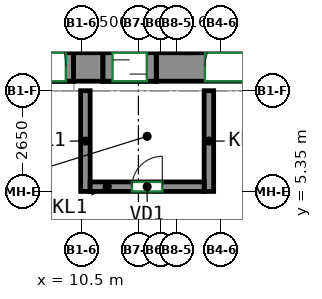
"""IFC4 building model, lengths in metres.
Left out: names, types, materials, properties, quantities, classifications, styles, units other than length and angle.
Written with IfcOpenShell. Run it as: python <this file> out.ifc"""

import sys

from ifc_helpers import new_model, si_unit, direction, frame, frame_2d, origin, place, context, subcontext, project, spatial, rectangle, extrude, source, transform, mapped, element, fill, save


model = new_model("IFC4")
c1 = context("Model", 3, precision=1e-05, world=origin(), true_north=direction((0.0, 1.0)))
c2 = subcontext(c1, "Body", "Model", "MODEL_VIEW")
j1 = project(units=[si_unit("LENGTHUNIT", "METRE"), si_unit("PLANEANGLEUNIT", "RADIAN")], contexts=[c1])
p1 = place(None, origin())
s1 = spatial("IfcSite", under=j1, at=p1, CompositionType="ELEMENT")
p2 = place(p1, origin())
s2 = spatial("IfcBuilding", under=s1, at=p2, CompositionType="ELEMENT")
p3 = place(p2, frame((0.0, 0.0, 223.7)))
s3 = spatial("IfcBuildingStorey", under=s2, at=p3, CompositionType="ELEMENT", Elevation=223.7)
m1 = source(origin(), c2, "Body", "SweptSolid", [
    extrude(rectangle(XDim=0.78, YDim=0.75, at=frame_2d((0.39, 0.0))), origin(), (0.0, 0.0, 1.0), 9.5),
])
p4 = place(p3, frame((10.29, 8.625, 0.0), z_axis=(0.0, 0.0, 1.0), x_axis=(1.0, 0.0, 0.0)))
e1 = element("IfcWall", 1, at=p4, inside=s3, PredefinedType="SHEAR", context=c2, shape_type="MappedRepresentation", body=[
    mapped(m1, transform((0.0, 0.0, 0.0))),
])
m2 = source(origin(), c2, "Body", "SweptSolid", [
    extrude(rectangle(XDim=5.38, YDim=0.75, at=frame_2d((2.69, 0.0))), origin(), (0.0, 0.0, 1.0), 9.5),
])
p5 = place(p3, frame((12.47, 8.625, 0.0), z_axis=(0.0, 0.0, 1.0), x_axis=(1.0, 0.0, 0.0)))
e2 = element("IfcWall", 2, at=p5, inside=s3, PredefinedType="SHEAR", context=c2, shape_type="MappedRepresentation", body=[
    mapped(m2, transform((0.0, 0.0, 0.0))),
])
p6 = place(p5, frame((1.28, 0.0, 0.0)))
e3 = element("IfcOpeningElement", 3, at=p6, cuts=e2, PredefinedType="OPENING", context=c2, shape_type="SweptSolid", body=[
    extrude(rectangle(XDim=1.1, YDim=2.1, at=frame_2d((0.55, 1.05))), frame((0.0, 0.385, 0.0), z_axis=(0.0, -1.0, 0.0), x_axis=(1.0, 0.0, 0.0)), (0.0, 0.0, 1.0), 0.77),
])
p7 = place(p5, frame((3.18, 0.0, 0.0)))
e4 = element("IfcOpeningElement", 4, at=p7, cuts=e2, PredefinedType="OPENING", context=c2, shape_type="SweptSolid", body=[
    extrude(rectangle(XDim=1.1, YDim=2.1, at=frame_2d((0.55, 1.05))), frame((0.0, 0.385, 0.0), z_axis=(0.0, -1.0, 0.0), x_axis=(1.0, 0.0, 0.0)), (0.0, 0.0, 1.0), 0.77),
])
m3 = source(origin(), c2, "Body", "SweptSolid", [
    extrude(rectangle(XDim=2.4, YDim=0.75, at=frame_2d((1.2, 0.0))), origin(), (0.0, 0.0, 1.0), 5.3),
])
p8 = place(p3, frame((7.89, 8.625, 4.2), z_axis=(0.0, 0.0, 1.0), x_axis=(1.0, 0.0, 0.0)))
e5 = element("IfcWall", 5, at=p8, inside=s3, PredefinedType="SHEAR", context=c2, shape_type="MappedRepresentation", body=[
    mapped(m3, transform((0.0, 0.0, 0.0))),
])
m4 = source(origin(), c2, "Body", "SweptSolid", [
    extrude(rectangle(XDim=1.4, YDim=0.75, at=frame_2d((0.7, 0.0))), origin(), (0.0, 0.0, 1.0), 5.55),
])
p9 = place(p3, frame((11.07, 8.625, 3.95), z_axis=(0.0, 0.0, 1.0), x_axis=(1.0, 0.0, 0.0)))
e6 = element("IfcWall", 6, at=p9, inside=s3, PredefinedType="SHEAR", context=c2, shape_type="MappedRepresentation", body=[
    mapped(m4, transform((0.0, 0.0, 0.0))),
])
m5 = source(origin(), c2, "Body", "SweptSolid", [
    extrude(rectangle(XDim=2.65, YDim=0.25, at=frame_2d((1.325, 0.0))), origin(), (0.0, 0.0, 1.0), 9.5),
])
for number, where, z_axis, x_axis in (
    (7, (10.605, 5.35, 0.0), (0.0, 0.0, 1.0), (0.0, 1.0, 0.0)),
    (8, (13.855, 5.35, 0.0), (0.0, 0.0, 1.0), (0.0, 1.0, 0.0)),
):
    element("IfcWall", number, at=place(p3, frame(where, z_axis=z_axis, x_axis=x_axis)), inside=s3, PredefinedType="PARTITIONING", context=c2, shape_type="MappedRepresentation", body=[
        mapped(m5, transform((0.0, 0.0, 0.0))),
    ])
m6 = source(origin(), c2, "Body", "SweptSolid", [
    extrude(rectangle(XDim=3.0, YDim=0.25, at=frame_2d((1.5, 0.0))), origin(), (0.0, 0.0, 1.0), 9.5),
])
p10 = place(p3, frame((10.73, 5.475, 0.0), z_axis=(0.0, 0.0, 1.0), x_axis=(1.0, 0.0, 0.0)))
e9 = element("IfcWall", 9, at=p10, inside=s3, PredefinedType="PARTITIONING", context=c2, shape_type="MappedRepresentation", body=[
    mapped(m6, transform((0.0, 0.0, 0.0))),
])
p11 = place(p10, frame((1.1, 0.0, 0.0)))
e10 = element("IfcOpeningElement", 10, at=p11, cuts=e9, PredefinedType="OPENING", context=c2, shape_type="SweptSolid", body=[
    extrude(rectangle(XDim=0.8, YDim=2.0, at=frame_2d((0.4, 1.0))), frame((0.0, 0.135, 0.0), z_axis=(0.0, -1.0, 0.0), x_axis=(1.0, 0.0, 0.0)), (0.0, 0.0, 1.0), 0.27),
])
m7 = source(origin(), c2, "Body", "SweptSolid", [
    extrude(rectangle(XDim=2.4, YDim=0.75, at=frame_2d((1.2, 0.0))), origin(), (0.0, 0.0, 1.0), 2.7),
])
p12 = place(p3, frame((7.89, 8.625, 0.0), z_axis=(0.0, 0.0, 1.0), x_axis=(1.0, 0.0, 0.0)))
e11 = element("IfcWall", 11, at=p12, inside=s3, PredefinedType="PARTITIONING", context=c2, shape_type="MappedRepresentation", body=[
    mapped(m7, transform((0.0, 0.0, 0.0))),
])
p13 = place(p12, frame((0.2, 0.0, 0.0)))
e12 = element("IfcOpeningElement", 12, at=p13, cuts=e11, PredefinedType="OPENING", context=c2, shape_type="SweptSolid", body=[
    extrude(rectangle(XDim=2.0, YDim=2.1, at=frame_2d((1.0, 1.05))), frame((0.0, 0.385, 0.0), z_axis=(0.0, -1.0, 0.0), x_axis=(1.0, 0.0, 0.0)), (0.0, 0.0, 1.0), 0.77),
])
m8 = source(origin(), c2, "Body", "SweptSolid", [
    extrude(rectangle(XDim=1.4, YDim=0.75, at=frame_2d((0.7, 0.0))), origin(), (0.0, 0.0, 1.0), 2.7),
])
p14 = place(p3, frame((11.07, 8.625, 0.0), z_axis=(0.0, 0.0, 1.0), x_axis=(1.0, 0.0, 0.0)))
e13 = element("IfcWall", 13, at=p14, inside=s3, PredefinedType="PARTITIONING", context=c2, shape_type="MappedRepresentation", body=[
    mapped(m8, transform((0.0, 0.0, 0.0))),
])
p15 = place(p14, frame((0.25, 0.0, 0.0)))
e14 = element("IfcOpeningElement", 14, at=p15, cuts=e13, PredefinedType="OPENING", context=c2, shape_type="SweptSolid", body=[
    extrude(rectangle(XDim=0.9, YDim=2.1, at=frame_2d((0.45, 1.05))), frame((0.0, 0.385, 0.0), z_axis=(0.0, -1.0, 0.0), x_axis=(1.0, 0.0, 0.0)), (0.0, 0.0, 1.0), 0.77),
])
p16 = place(p13, origin())
e15 = element("IfcDoor", 15, at=p16, inside=s3, OperationType="DOUBLE_DOOR_SINGLE_SWING", PredefinedType="DOOR", context=c2, shape_type="SweptSolid", body=[
    extrude(rectangle(XDim=2.0, YDim=2.1, at=frame_2d((1.0, 1.05))), frame((0.0, 0.28, 0.0), z_axis=(0.0, -1.0, 0.0), x_axis=(1.0, 0.0, 0.0)), (0.0, 0.0, 1.0), 0.05),
])
fill(e12, e15)
p17 = place(p11, origin())
e16 = element("IfcDoor", 16, at=p17, inside=s3, OperationType="SINGLE_SWING_RIGHT", PredefinedType="DOOR", context=c2, shape_type="SweptSolid", body=[
    extrude(rectangle(XDim=0.8, YDim=2.0, at=frame_2d((0.4, 1.0))), frame((0.0, 0.025, 0.0), z_axis=(0.0, -1.0, 0.0), x_axis=(1.0, 0.0, 0.0)), (0.0, 0.0, 1.0), 0.05),
])
fill(e10, e16)
p18 = place(p15, origin())
e17 = element("IfcDoor", 17, at=p18, inside=s3, OperationType="SLIDING_TO_LEFT", PredefinedType="DOOR", context=c2, shape_type="SweptSolid", body=[
    extrude(rectangle(XDim=0.9, YDim=2.1, at=frame_2d((0.45, 1.05))), frame((0.0, 0.28, 0.0), z_axis=(0.0, -1.0, 0.0), x_axis=(1.0, 0.0, 0.0)), (0.0, 0.0, 1.0), 0.05),
])
fill(e14, e17)
p19 = place(p6, origin())
e18 = element("IfcDoor", 18, at=p19, inside=s3, OperationType="SINGLE_SWING_RIGHT", PredefinedType="DOOR", context=c2, shape_type="SweptSolid", body=[
    extrude(rectangle(XDim=1.1, YDim=2.1, at=frame_2d((0.55, 1.05))), frame((0.0, 0.28, 0.0), z_axis=(0.0, -1.0, 0.0), x_axis=(1.0, 0.0, 0.0)), (0.0, 0.0, 1.0), 0.05),
])
fill(e3, e18)
save(model, sys.argv[1])
